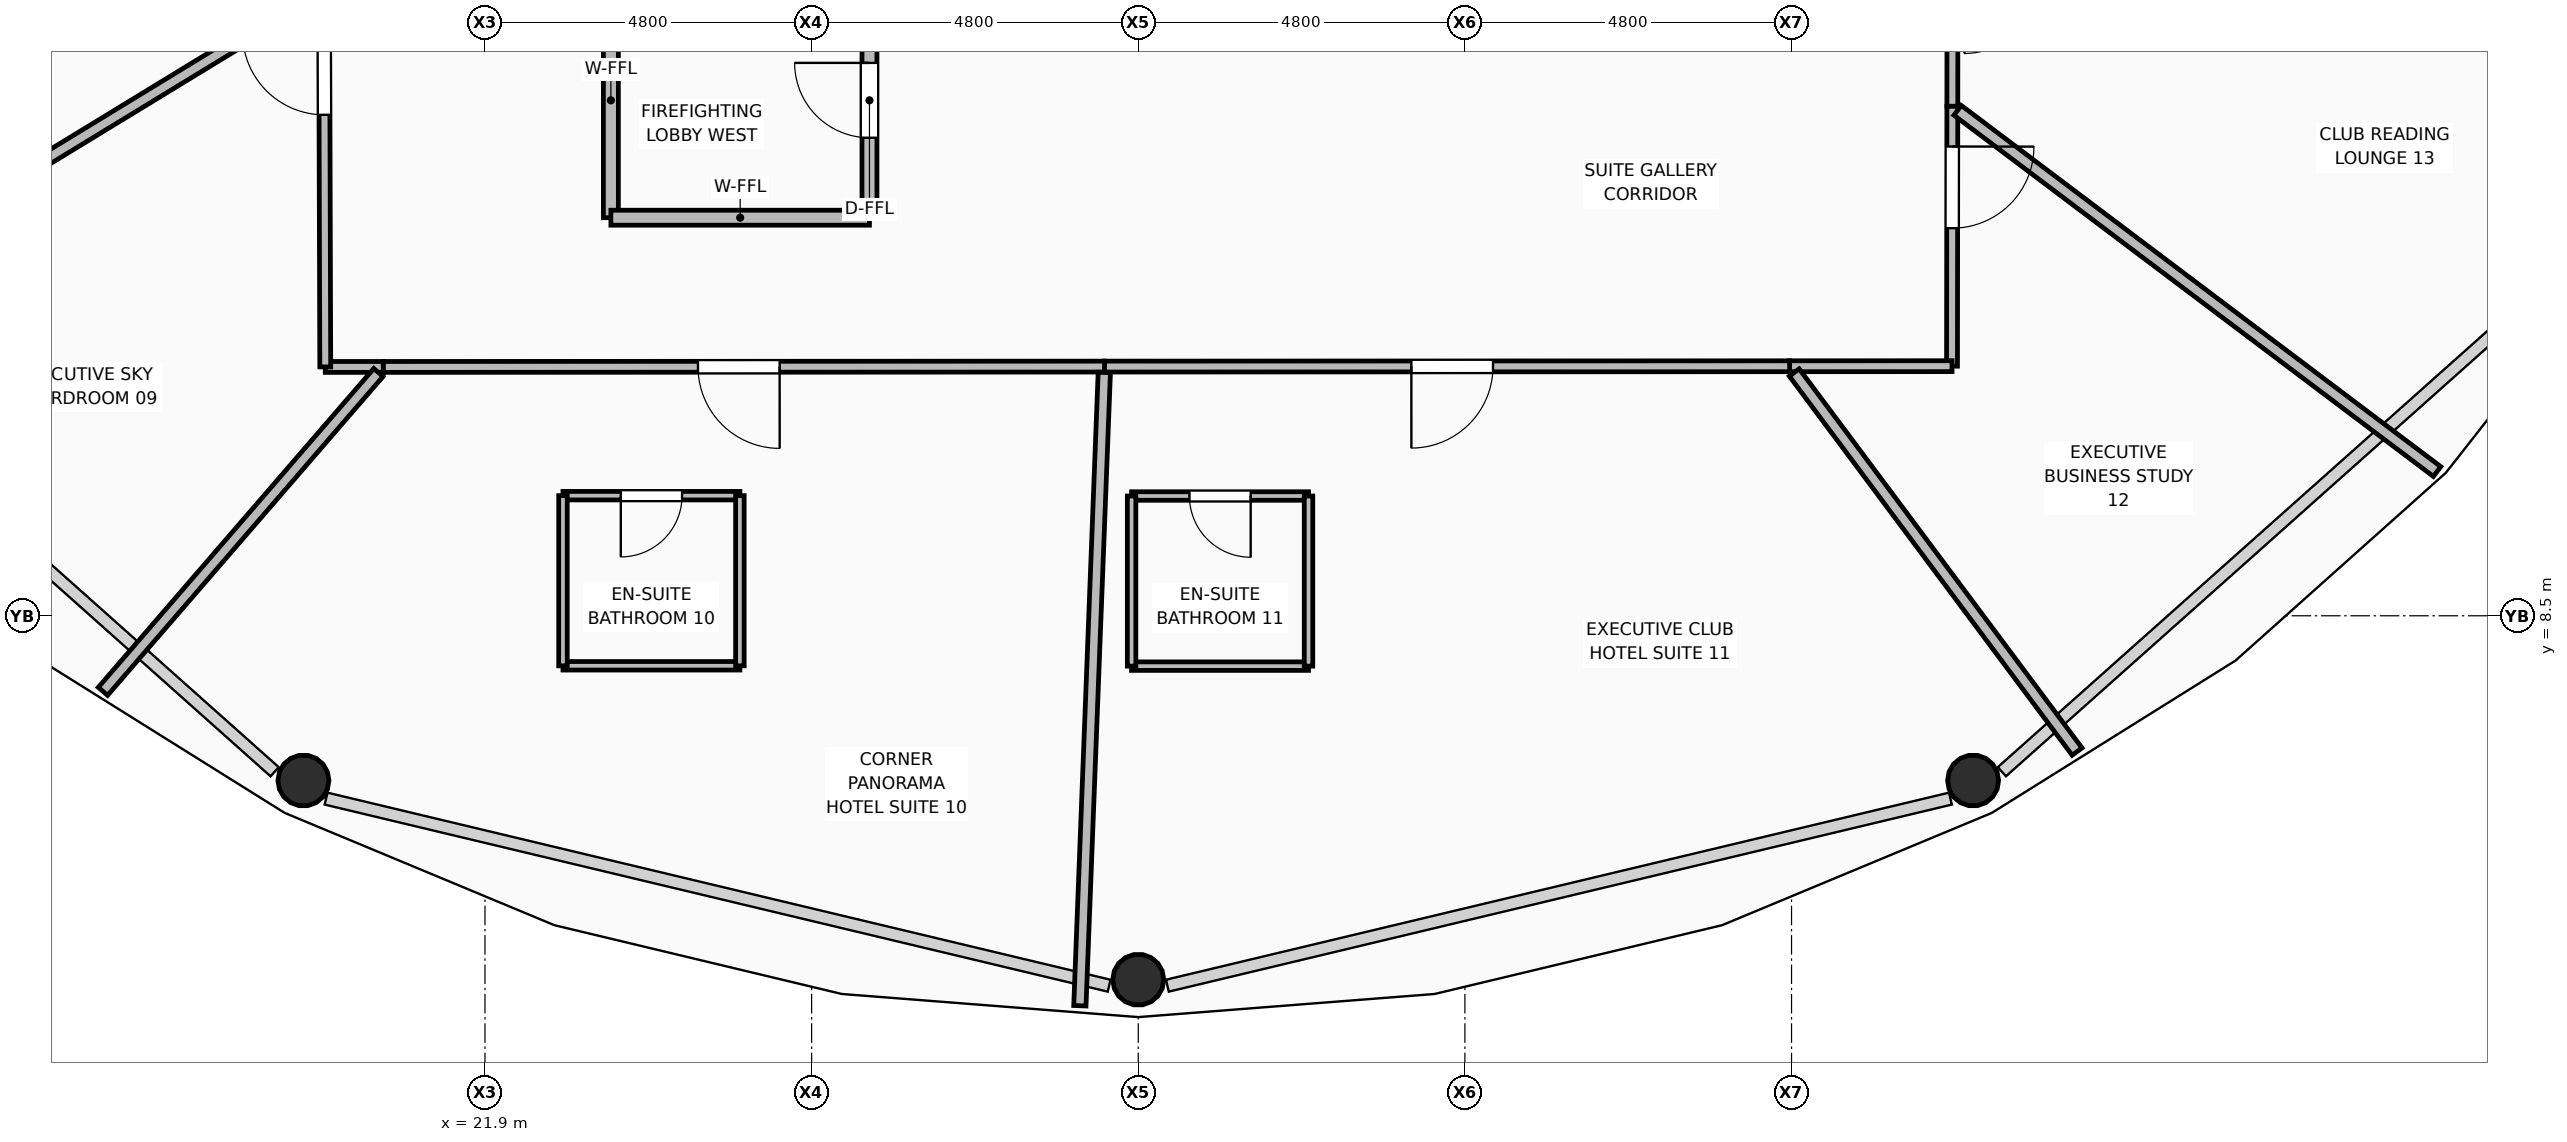
"""IFC4 building model, lengths in metres.
Left out: names, types, materials, properties, quantities, classifications, styles, units other than length and angle.
Written with IfcOpenShell. Run it as: python <this file> out.ifc"""

import sys

from ifc_helpers import new_model, si_unit, direction, frame, frame_2d, origin, origin_2d, place, context, subcontext, project, spatial, rectangle, hollow_circle, extrude, element, fill, save


model = new_model("IFC4")
c1 = context("Model", 3, precision=1e-05, world=origin(), true_north=direction((0.0, 1.0)))
c2 = subcontext(c1, "Body", "Model", "MODEL_VIEW")
j1 = project(units=[si_unit("LENGTHUNIT", "METRE"), si_unit("PLANEANGLEUNIT", "RADIAN")], contexts=[c1])
p1 = place(None, origin())
s1 = spatial("IfcSite", under=j1, at=p1, CompositionType="ELEMENT")
p2 = place(p1, origin())
s2 = spatial("IfcBuilding", under=s1, at=p2, CompositionType="ELEMENT")
p3 = place(p2, frame((0.0, 0.0, 164.7)))
s3 = spatial("IfcBuildingStorey", under=s2, at=p3, CompositionType="ELEMENT", Elevation=164.7)
for number, where, z_axis, x_axis in (
    (1, (19.232, 6.079, 0.0), (0.0, 0.0, 1.0), (1.0, 0.0, 0.0)),
    (2, (31.5, 3.152, 0.0), (0.0, 0.0, 1.0), (1.0, 0.0, 0.0)),
    (3, (43.768, 6.079, 0.0), (0.0, 0.0, 1.0), (1.0, 0.0, 0.0)),
):
    element("IfcColumn", number, at=place(p3, frame(where, z_axis=z_axis, x_axis=x_axis)), inside=s3, PredefinedType="COLUMN", context=c2, shape_type="SweptSolid", body=[
        extrude(hollow_circle(Radius=0.375, WallThickness=0.035, at=origin_2d()), origin(), (0.0, 0.0, 1.0), 3.57),
    ])
p4 = place(p3, frame((23.75, 14.35, 0.0), z_axis=(0.0, 0.0, 1.0), x_axis=(0.0, 1.0, 0.0)))
e4 = element("IfcWall", 4, at=p4, inside=s3, PredefinedType="PARTITIONING", context=c2, shape_type="SweptSolid", body=[
    extrude(rectangle(XDim=3.45, YDim=0.22, at=frame_2d((1.725, 0.0))), origin(), (0.0, 0.0, 1.0), 3.006),
])
p5 = place(p3, frame((23.75, 14.35, 0.0), z_axis=(0.0, 0.0, 1.0), x_axis=(1.0, 0.0, 0.0)))
e5 = element("IfcWall", 5, at=p5, inside=s3, PredefinedType="PARTITIONING", context=c2, shape_type="SweptSolid", body=[
    extrude(rectangle(XDim=3.8, YDim=0.22, at=frame_2d((1.9, 0.0))), origin(), (0.0, 0.0, 1.0), 3.55),
])
p6 = place(p3, frame((27.55, 14.35, 0.0), z_axis=(0.0, 0.0, 1.0), x_axis=(0.0, 1.0, 0.0)))
e6 = element("IfcWall", 6, at=p6, inside=s3, PredefinedType="PARTITIONING", context=c2, shape_type="SweptSolid", body=[
    extrude(rectangle(XDim=3.45, YDim=0.22, at=frame_2d((1.725, 0.0))), origin(), (0.0, 0.0, 1.0), 3.006),
])
p7 = place(p6, frame((1.175, 0.0, 0.0)))
e7 = element("IfcOpeningElement", 7, at=p7, cuts=e6, PredefinedType="OPENING", context=c2, shape_type="SweptSolid", body=[
    extrude(rectangle(XDim=1.1, YDim=2.1, at=frame_2d((0.55, 1.05))), frame((0.0, 0.12, 0.0), z_axis=(0.0, -1.0, 0.0), x_axis=(1.0, 0.0, 0.0)), (0.0, 0.0, 1.0), 0.24),
])
p8 = place(p3, frame((43.465, 17.96, 0.0), z_axis=(0.0, 0.0, 1.0), x_axis=(-0.001113722858, -0.999999379811, 0.0)))
e8 = element("IfcWall", 8, at=p8, inside=s3, PredefinedType="PARTITIONING", context=c2, shape_type="SweptSolid", body=[
    extrude(rectangle(XDim=1.973, YDim=0.16, at=frame_2d((0.986, 0.0))), origin(), (0.0, 0.0, 1.0), 3.006),
])
p9 = place(p3, frame((43.463, 15.987, 0.0), z_axis=(0.0, 0.0, 1.0), x_axis=(-0.001278526092, -0.999999182685, 0.0)))
e9 = element("IfcWall", 9, at=p9, inside=s3, PredefinedType="PARTITIONING", context=c2, shape_type="SweptSolid", body=[
    extrude(rectangle(XDim=3.819, YDim=0.16, at=frame_2d((1.91, 0.0))), origin(), (0.0, 0.0, 1.0), 3.55),
])
p10 = place(p9, frame((0.591, 0.0, 0.0)))
e10 = element("IfcOpeningElement", 10, at=p10, cuts=e9, PredefinedType="OPENING", context=c2, shape_type="SweptSolid", body=[
    extrude(rectangle(XDim=1.2, YDim=2.1, at=frame_2d((0.6, 1.05))), frame((0.0, 0.09, 0.0), z_axis=(0.0, -1.0, 0.0), x_axis=(1.0, 0.0, 0.0)), (0.0, 0.0, 1.0), 0.18),
])
p11 = place(p3, frame((43.458, 12.168, 0.0), z_axis=(0.0, 0.0, 1.0), x_axis=(-0.99999991624, -0.000409290869, 0.0)))
e11 = element("IfcWall", 11, at=p11, inside=s3, PredefinedType="PARTITIONING", context=c2, shape_type="SweptSolid", body=[
    extrude(rectangle(XDim=2.386, YDim=0.16, at=frame_2d((1.193, 0.0))), origin(), (0.0, 0.0, 1.0), 3.006),
])
p12 = place(p3, frame((41.072, 12.167, 0.0), z_axis=(0.0, 0.0, 1.0), x_axis=(-0.999999882398, -0.000484977755, 0.0)))
e12 = element("IfcWall", 12, at=p12, inside=s3, PredefinedType="PARTITIONING", context=c2, shape_type="SweptSolid", body=[
    extrude(rectangle(XDim=10.068, YDim=0.16, at=frame_2d((5.034, 0.0))), origin(), (0.0, 0.0, 1.0), 3.006),
])
p13 = place(p12, frame((4.359, 0.0, 0.0)))
e13 = element("IfcOpeningElement", 13, at=p13, cuts=e12, PredefinedType="OPENING", context=c2, shape_type="SweptSolid", body=[
    extrude(rectangle(XDim=1.2, YDim=2.1, at=frame_2d((0.6, 1.05))), frame((0.0, 0.09, 0.0), z_axis=(0.0, -1.0, 0.0), x_axis=(1.0, 0.0, 0.0)), (0.0, 0.0, 1.0), 0.18),
])
p14 = place(p3, frame((31.004, 12.162, 0.0), z_axis=(0.0, 0.0, 1.0), x_axis=(-0.999999883026, -0.000483681451, 0.0)))
e14 = element("IfcWall", 14, at=p14, inside=s3, PredefinedType="PARTITIONING", context=c2, shape_type="SweptSolid", body=[
    extrude(rectangle(XDim=10.6, YDim=0.16, at=frame_2d((5.3, 0.0))), origin(), (0.0, 0.0, 1.0), 3.006),
])
p15 = place(p14, frame((4.774, 0.0, 0.0)))
e15 = element("IfcOpeningElement", 15, at=p15, cuts=e14, PredefinedType="OPENING", context=c2, shape_type="SweptSolid", body=[
    extrude(rectangle(XDim=1.2, YDim=2.1, at=frame_2d((0.6, 1.05))), frame((0.0, 0.09, 0.0), z_axis=(0.0, -1.0, 0.0), x_axis=(1.0, 0.0, 0.0)), (0.0, 0.0, 1.0), 0.18),
])
p16 = place(p3, frame((20.404, 12.157, 0.0), z_axis=(0.0, 0.0, 1.0), x_axis=(-1.0, 0.0, 0.0)))
e16 = element("IfcWall", 16, at=p16, inside=s3, PredefinedType="PARTITIONING", context=c2, shape_type="SweptSolid", body=[
    extrude(rectangle(XDim=0.851, YDim=0.16, at=frame_2d((0.426, 0.0))), origin(), (0.0, 0.0, 1.0), 3.006),
])
p17 = place(p3, frame((19.553, 12.157, 0.0), z_axis=(0.0, 0.0, 1.0), x_axis=(-0.003113283747, 0.99999515372, 0.0)))
e17 = element("IfcWall", 17, at=p17, inside=s3, PredefinedType="PARTITIONING", context=c2, shape_type="SweptSolid", body=[
    extrude(rectangle(XDim=5.803, YDim=0.16, at=frame_2d((2.901, 0.0))), origin(), (0.0, 0.0, 1.0), 3.006),
])
p18 = place(p17, frame((3.705, 0.0, 0.0)))
e18 = element("IfcOpeningElement", 18, at=p18, cuts=e17, PredefinedType="OPENING", context=c2, shape_type="SweptSolid", body=[
    extrude(rectangle(XDim=1.2, YDim=2.1, at=frame_2d((0.6, 1.05))), frame((0.0, 0.09, 0.0), z_axis=(0.0, -1.0, 0.0), x_axis=(1.0, 0.0, 0.0)), (0.0, 0.0, 1.0), 0.18),
])
p19 = place(p3, frame((19.46, 17.656, 0.0), z_axis=(0.0, 0.0, 1.0), x_axis=(-0.853711993856, -0.520745457537, 0.0)))
e19 = element("IfcWall", 19, at=p19, inside=s3, PredefinedType="PARTITIONING", context=c2, shape_type="SweptSolid", body=[
    extrude(rectangle(XDim=9.968, YDim=0.18, at=frame_2d((4.984, 0.0))), origin(), (0.0, 0.0, 1.0), 2.852),
])
p20 = place(p3, frame((20.334, 12.075, 0.0), z_axis=(0.0, 0.0, 1.0), x_axis=(-0.653796426348, -0.756670491624, 0.0)))
e20 = element("IfcWall", 20, at=p20, inside=s3, PredefinedType="PARTITIONING", context=c2, shape_type="SweptSolid", body=[
    extrude(rectangle(XDim=6.192, YDim=0.18, at=frame_2d((3.096, 0.0))), origin(), (0.0, 0.0, 1.0), 2.852),
])
p21 = place(p3, frame((31.001, 12.075, 0.0), z_axis=(0.0, 0.0, 1.0), x_axis=(-0.038536822303, -0.999257180773, 0.0)))
e21 = element("IfcWall", 21, at=p21, inside=s3, PredefinedType="PARTITIONING", context=c2, shape_type="SweptSolid", body=[
    extrude(rectangle(XDim=9.313, YDim=0.18, at=frame_2d((4.656, 0.0))), origin(), (0.0, 0.0, 1.0), 2.852),
])
p22 = place(p3, frame((41.14, 12.075, 0.0), z_axis=(0.0, 0.0, 1.0), x_axis=(0.597946680124, -0.8015358805, 0.0)))
e22 = element("IfcWall", 22, at=p22, inside=s3, PredefinedType="PARTITIONING", context=c2, shape_type="SweptSolid", body=[
    extrude(rectangle(XDim=6.95, YDim=0.18, at=frame_2d((3.475, 0.0))), origin(), (0.0, 0.0, 1.0), 2.852),
])
p23 = place(p3, frame((43.54, 15.928, 0.0), z_axis=(0.0, 0.0, 1.0), x_axis=(0.798722893144, -0.601699044347, 0.0)))
e23 = element("IfcWall", 23, at=p23, inside=s3, PredefinedType="PARTITIONING", context=c2, shape_type="SweptSolid", body=[
    extrude(rectangle(XDim=8.822, YDim=0.18, at=frame_2d((4.411, 0.0))), origin(), (0.0, 0.0, 1.0), 2.852),
])
p24 = place(p3, frame((23.046, 7.765, 0.0), z_axis=(0.0, 0.0, 1.0), x_axis=(1.0, 0.0, 0.0)))
e24 = element("IfcWall", 24, at=p24, inside=s3, PredefinedType="PARTITIONING", context=c2, shape_type="SweptSolid", body=[
    extrude(rectangle(XDim=2.6, YDim=0.125, at=frame_2d((1.3, 0.0))), origin(), (0.0, 0.0, 1.0), 3.55),
])
p25 = place(p3, frame((23.046, 10.265, 0.0), z_axis=(0.0, 0.0, 1.0), x_axis=(1.0, 0.0, 0.0)))
e25 = element("IfcWall", 25, at=p25, inside=s3, PredefinedType="PARTITIONING", context=c2, shape_type="SweptSolid", body=[
    extrude(rectangle(XDim=2.6, YDim=0.125, at=frame_2d((1.3, 0.0))), origin(), (0.0, 0.0, 1.0), 3.55),
])
p26 = place(p25, frame((0.85, 0.0, 0.0)))
e26 = element("IfcOpeningElement", 26, at=p26, cuts=e25, PredefinedType="OPENING", context=c2, shape_type="SweptSolid", body=[
    extrude(rectangle(XDim=0.9, YDim=2.1, at=frame_2d((0.45, 1.05))), frame((0.0, 0.073, 0.0), z_axis=(0.0, -1.0, 0.0), x_axis=(1.0, 0.0, 0.0)), (0.0, 0.0, 1.0), 0.145),
])
for number, where, z_axis, x_axis in (
    (27, (23.046, 7.765, 0.0), (0.0, 0.0, 1.0), (0.0, 1.0, 0.0)),
    (28, (25.646, 7.765, 0.0), (0.0, 0.0, 1.0), (0.0, 1.0, 0.0)),
):
    element("IfcWall", number, at=place(p3, frame(where, z_axis=z_axis, x_axis=x_axis)), inside=s3, PredefinedType="PARTITIONING", context=c2, shape_type="SweptSolid", body=[
        extrude(rectangle(XDim=2.5, YDim=0.125, at=frame_2d((1.25, 0.0))), origin(), (0.0, 0.0, 1.0), 3.55),
    ])
p27 = place(p3, frame((31.402, 7.76, 0.0), z_axis=(0.0, 0.0, 1.0), x_axis=(1.0, 0.0, 0.0)))
e29 = element("IfcWall", 29, at=p27, inside=s3, PredefinedType="PARTITIONING", context=c2, shape_type="SweptSolid", body=[
    extrude(rectangle(XDim=2.6, YDim=0.125, at=frame_2d((1.3, 0.0))), origin(), (0.0, 0.0, 1.0), 3.006),
])
p28 = place(p3, frame((31.402, 10.26, 0.0), z_axis=(0.0, 0.0, 1.0), x_axis=(1.0, 0.0, 0.0)))
e30 = element("IfcWall", 30, at=p28, inside=s3, PredefinedType="PARTITIONING", context=c2, shape_type="SweptSolid", body=[
    extrude(rectangle(XDim=2.6, YDim=0.125, at=frame_2d((1.3, 0.0))), origin(), (0.0, 0.0, 1.0), 3.006),
])
p29 = place(p28, frame((0.85, 0.0, 0.0)))
e31 = element("IfcOpeningElement", 31, at=p29, cuts=e30, PredefinedType="OPENING", context=c2, shape_type="SweptSolid", body=[
    extrude(rectangle(XDim=0.9, YDim=2.1, at=frame_2d((0.45, 1.05))), frame((0.0, 0.073, 0.0), z_axis=(0.0, -1.0, 0.0), x_axis=(1.0, 0.0, 0.0)), (0.0, 0.0, 1.0), 0.145),
])
p30 = place(p3, frame((31.402, 7.76, 0.0), z_axis=(0.0, 0.0, 1.0), x_axis=(0.0, 1.0, 0.0)))
e32 = element("IfcWall", 32, at=p30, inside=s3, PredefinedType="PARTITIONING", context=c2, shape_type="SweptSolid", body=[
    extrude(rectangle(XDim=2.5, YDim=0.125, at=frame_2d((1.25, 0.0))), origin(), (0.0, 0.0, 1.0), 3.006),
])
p31 = place(p3, frame((34.002, 7.76, 0.0), z_axis=(0.0, 0.0, 1.0), x_axis=(0.0, 1.0, 0.0)))
e33 = element("IfcWall", 33, at=p31, inside=s3, PredefinedType="PARTITIONING", context=c2, shape_type="SweptSolid", body=[
    extrude(rectangle(XDim=2.5, YDim=0.125, at=frame_2d((1.25, 0.0))), origin(), (0.0, 0.0, 1.0), 3.55),
])
p32 = place(p7, origin())
e34 = element("IfcDoor", 34, at=p32, inside=s3, OperationType="SINGLE_SWING_RIGHT", PredefinedType="DOOR", context=c2, shape_type="SweptSolid", body=[
    extrude(rectangle(XDim=1.1, YDim=2.1, at=frame_2d((0.55, 1.05))), frame((0.0, 0.025, 0.0), z_axis=(0.0, -1.0, 0.0), x_axis=(1.0, 0.0, 0.0)), (0.0, 0.0, 1.0), 0.05),
])
fill(e7, e34)
p33 = place(p18, origin())
e35 = element("IfcDoor", 35, at=p33, inside=s3, OperationType="SINGLE_SWING_RIGHT", PredefinedType="DOOR", context=c2, shape_type="SweptSolid", body=[
    extrude(rectangle(XDim=1.2, YDim=2.1, at=frame_2d((0.6, 1.05))), frame((0.0, 0.025, 0.0), z_axis=(0.0, -1.0, 0.0), x_axis=(1.0, 0.0, 0.0)), (0.0, 0.0, 1.0), 0.05),
])
fill(e18, e35)
p34 = place(p26, frame((0.9, 0.0, 0.0), z_axis=(0.0, 0.0, 1.0), x_axis=(-1.0, 0.0, 0.0)))
e36 = element("IfcDoor", 36, at=p34, inside=s3, OperationType="SINGLE_SWING_RIGHT", PredefinedType="DOOR", context=c2, shape_type="SweptSolid", body=[
    extrude(rectangle(XDim=0.9, YDim=2.1, at=frame_2d((0.45, 1.05))), frame((0.0, 0.025, 0.0), z_axis=(0.0, -1.0, 0.0), x_axis=(1.0, 0.0, 0.0)), (0.0, 0.0, 1.0), 0.05),
])
fill(e26, e36)
p35 = place(p15, origin())
e37 = element("IfcDoor", 37, at=p35, inside=s3, OperationType="SINGLE_SWING_LEFT", PredefinedType="DOOR", context=c2, shape_type="SweptSolid", body=[
    extrude(rectangle(XDim=1.2, YDim=2.1, at=frame_2d((0.6, 1.05))), frame((0.0, 0.025, 0.0), z_axis=(0.0, -1.0, 0.0), x_axis=(1.0, 0.0, 0.0)), (0.0, 0.0, 1.0), 0.05),
])
fill(e15, e37)
p36 = place(p29, frame((0.9, 0.0, 0.0), z_axis=(0.0, 0.0, 1.0), x_axis=(-1.0, 0.0, 0.0)))
e38 = element("IfcDoor", 38, at=p36, inside=s3, OperationType="SINGLE_SWING_LEFT", PredefinedType="DOOR", context=c2, shape_type="SweptSolid", body=[
    extrude(rectangle(XDim=0.9, YDim=2.1, at=frame_2d((0.45, 1.05))), frame((0.0, 0.025, 0.0), z_axis=(0.0, -1.0, 0.0), x_axis=(1.0, 0.0, 0.0)), (0.0, 0.0, 1.0), 0.05),
])
fill(e31, e38)
p37 = place(p13, origin())
e39 = element("IfcDoor", 39, at=p37, inside=s3, OperationType="SINGLE_SWING_RIGHT", PredefinedType="DOOR", context=c2, shape_type="SweptSolid", body=[
    extrude(rectangle(XDim=1.2, YDim=2.1, at=frame_2d((0.6, 1.05))), frame((0.0, 0.025, 0.0), z_axis=(0.0, -1.0, 0.0), x_axis=(1.0, 0.0, 0.0)), (0.0, 0.0, 1.0), 0.05),
])
fill(e13, e39)
p38 = place(p10, origin())
e40 = element("IfcDoor", 40, at=p38, inside=s3, OperationType="SINGLE_SWING_LEFT", PredefinedType="DOOR", context=c2, shape_type="SweptSolid", body=[
    extrude(rectangle(XDim=1.2, YDim=2.1, at=frame_2d((0.6, 1.05))), frame((0.0, 0.025, 0.0), z_axis=(0.0, -1.0, 0.0), x_axis=(1.0, 0.0, 0.0)), (0.0, 0.0, 1.0), 0.05),
])
fill(e10, e40)
save(model, sys.argv[1])
